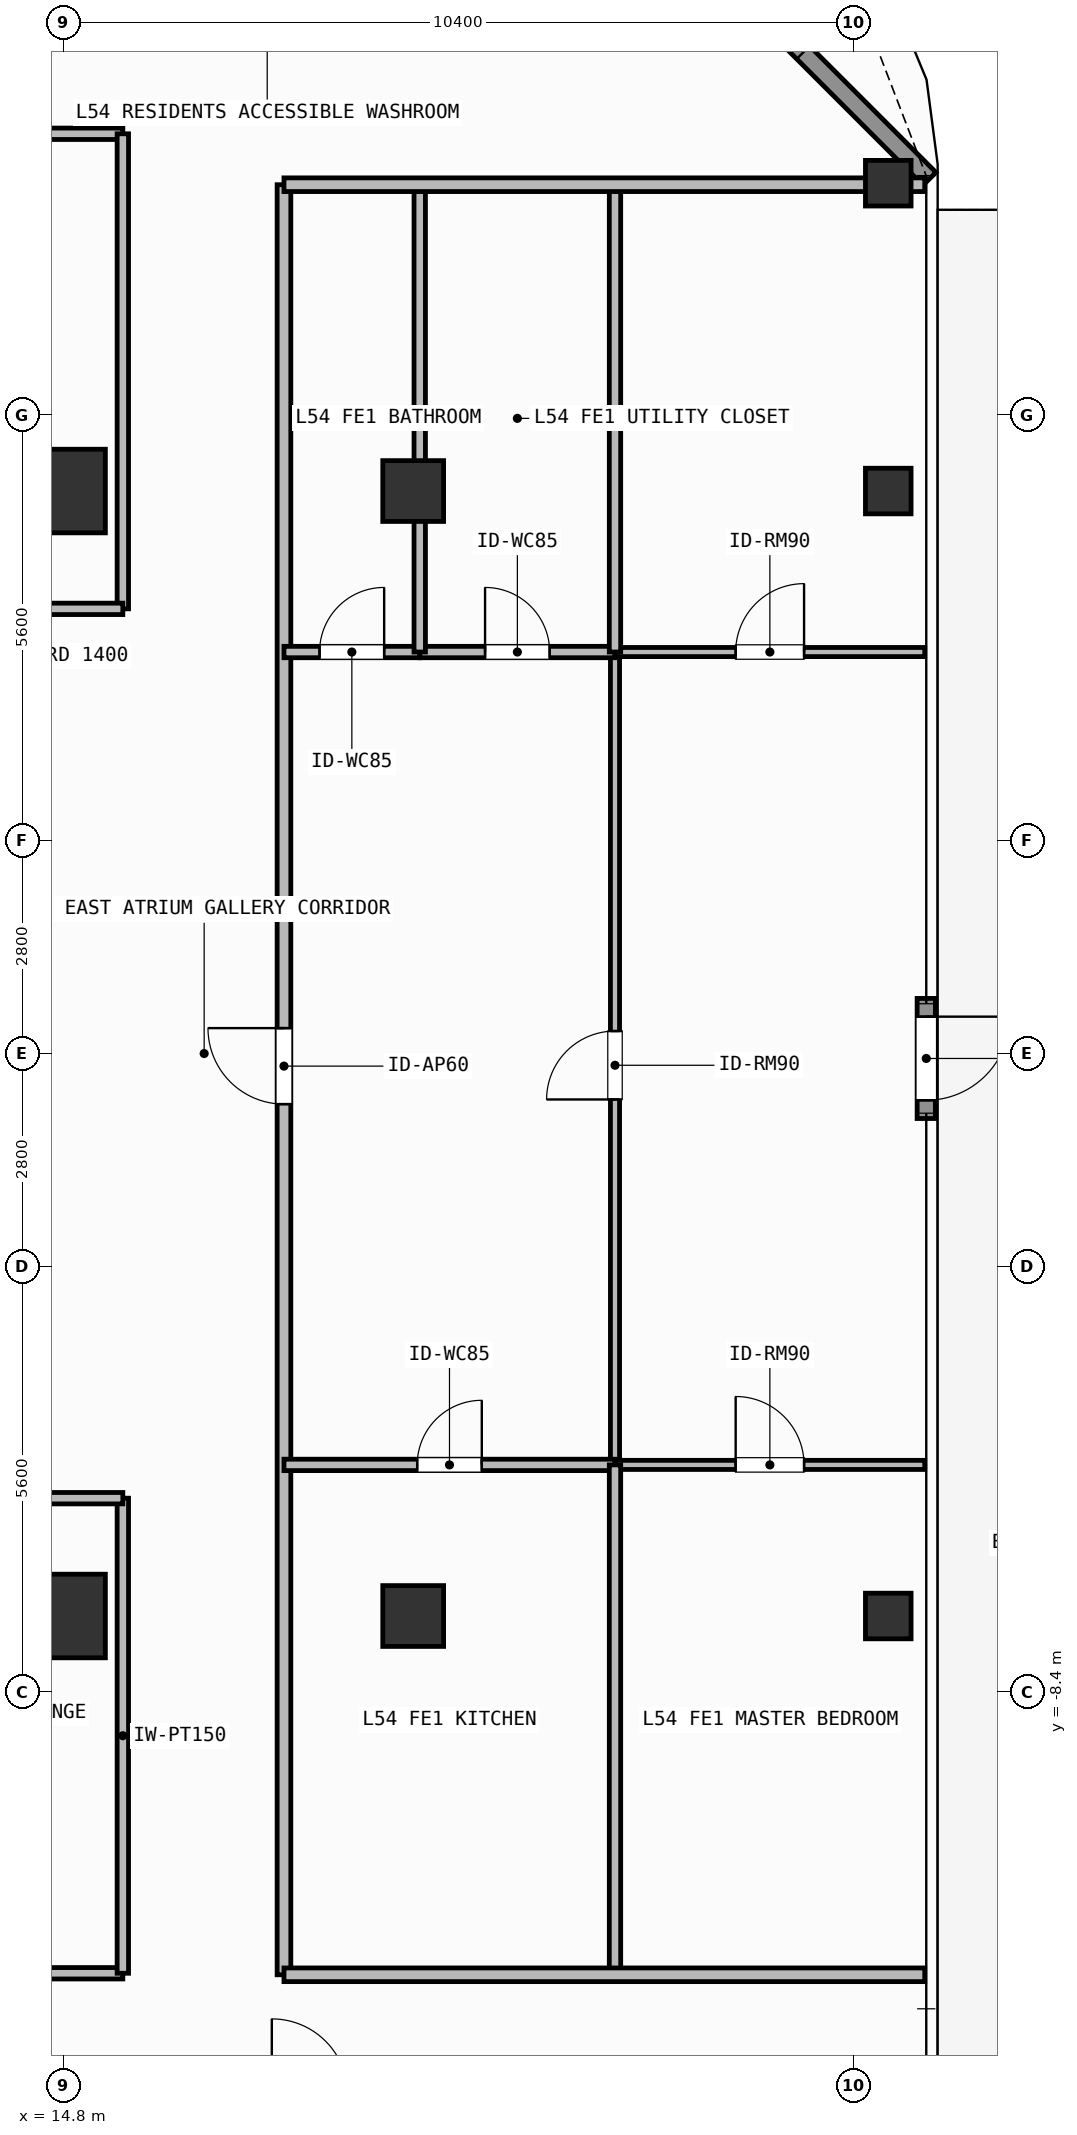
"""IFC4 building model, lengths in metres.
Left out: names, types, materials, properties, quantities, classifications, styles, units other than length and angle.
Written with IfcOpenShell. Run it as: python <this file> out.ifc"""

import sys

from ifc_helpers import new_model, si_unit, direction, frame, frame_2d, origin, origin_2d, place, context, subcontext, project, spatial, rectangle, hollow_rectangle, extrude, element, fill, save


model = new_model("IFC4")
c1 = context("Model", 3, precision=1e-05, world=origin(), true_north=direction((0.0, 1.0)))
c2 = subcontext(c1, "Body", "Model", "MODEL_VIEW")
j1 = project(units=[si_unit("LENGTHUNIT", "METRE"), si_unit("PLANEANGLEUNIT", "RADIAN")], contexts=[c1])
p1 = place(None, origin())
s1 = spatial("IfcSite", under=j1, at=p1, CompositionType="ELEMENT")
p2 = place(p1, origin())
s2 = spatial("IfcBuilding", under=s1, at=p2, CompositionType="ELEMENT")
p3 = place(p2, frame((0.0, 0.0, 219.6)))
s3 = spatial("IfcBuildingStorey", under=s2, at=p3, CompositionType="ELEMENT", Elevation=219.6)
for number, where, z_axis, x_axis in (
    (1, (14.8, -7.4, 0.0), (0.0, 0.0, 1.0), (1.0, 0.0, 0.0)),
    (2, (14.8, 7.4, 0.0), (0.0, 0.0, 1.0), (1.0, 0.0, 0.0)),
):
    element("IfcColumn", number, at=place(p3, frame(where, z_axis=z_axis, x_axis=x_axis)), inside=s3, PredefinedType="COLUMN", context=c2, shape_type="SweptSolid", body=[
        extrude(rectangle(XDim=1.1, YDim=1.1, at=origin_2d()), origin(), (0.0, 0.0, 1.0), 3.9),
    ])
for number, where, z_axis, x_axis in (
    (3, (19.4, -7.4, 0.0), (0.0, 0.0, 1.0), (1.0, 0.0, 0.0)),
    (4, (19.4, 7.4, 0.0), (0.0, 0.0, 1.0), (1.0, 0.0, 0.0)),
):
    element("IfcColumn", number, at=place(p3, frame(where, z_axis=z_axis, x_axis=x_axis)), inside=s3, PredefinedType="COLUMN", context=c2, shape_type="SweptSolid", body=[
        extrude(hollow_rectangle(XDim=0.8, YDim=0.8, WallThickness=0.036, at=origin_2d()), origin(), (0.0, 0.0, 1.0), 3.9),
    ])
for number, where, z_axis, x_axis in (
    (5, (25.65, 11.45, 0.0), (0.0, 0.0, 1.0), (1.0, 0.0, 0.0)),
    (6, (25.65, -7.4, 0.0), (0.0, 0.0, 1.0), (1.0, 0.0, 0.0)),
    (7, (25.65, 7.4, 0.0), (0.0, 0.0, 1.0), (1.0, 0.0, 0.0)),
):
    element("IfcColumn", number, at=place(p3, frame(where, z_axis=z_axis, x_axis=x_axis)), inside=s3, PredefinedType="COLUMN", context=c2, shape_type="SweptSolid", body=[
        extrude(hollow_rectangle(XDim=0.6, YDim=0.6, WallThickness=0.028, at=origin_2d()), origin(), (0.0, 0.0, 1.0), 3.9),
    ])
p4 = place(p3, frame((26.15, 0.725, 0.0), z_axis=(0.0, 0.0, 1.0), x_axis=(0.0, -1.0, 0.0)))
e8 = element("IfcWall", 8, at=p4, inside=s3, PredefinedType="SOLIDWALL", context=c2, shape_type="SweptSolid", body=[
    extrude(rectangle(XDim=1.58, YDim=0.24, at=frame_2d((0.79, 0.0))), origin(), (0.0, 0.0, 1.0), 3.68),
])
p5 = place(p4, frame((0.24, 0.0, 0.0)))
e9 = element("IfcOpeningElement", 9, at=p5, cuts=e8, PredefinedType="OPENING", context=c2, shape_type="SweptSolid", body=[
    extrude(rectangle(XDim=1.1, YDim=2.2, at=frame_2d((0.55, 1.1))), frame((0.0, 0.13, 0.0), z_axis=(0.0, -1.0, 0.0), x_axis=(1.0, 0.0, 0.0)), (0.0, 0.0, 1.0), 0.26),
])
p6 = place(p3, frame((21.808, 15.892, 0.0), z_axis=(0.0, 0.0, 1.0), x_axis=(0.707106781187, -0.707106781187, 0.0)))
e10 = element("IfcWall", 10, at=p6, inside=s3, PredefinedType="SOLIDWALL", context=c2, shape_type="SweptSolid", body=[
    extrude(rectangle(XDim=6.201, YDim=0.24, at=frame_2d((3.101, 0.0))), origin(), (0.0, 0.0, 1.0), 3.68),
])
p7 = place(p6, frame((2.351, 0.0, 0.8)))
e11 = element("IfcOpeningElement", 11, at=p7, cuts=e10, PredefinedType="OPENING", context=c2, shape_type="SweptSolid", body=[
    extrude(rectangle(XDim=1.5, YDim=1.85, at=frame_2d((0.75, 0.925))), frame((0.0, 0.13, 0.0), z_axis=(0.0, -1.0, 0.0), x_axis=(1.0, 0.0, 0.0)), (0.0, 0.0, 1.0), 0.26),
])
p8 = place(p3, frame((10.1, -12.1, 0.0), z_axis=(0.0, 0.0, 1.0), x_axis=(1.0, 0.0, 0.0)))
e12 = element("IfcWall", 12, at=p8, inside=s3, PredefinedType="PARTITIONING", context=c2, shape_type="SweptSolid", body=[
    extrude(rectangle(XDim=5.48, YDim=0.15, at=frame_2d((2.74, 0.0))), origin(), (0.0, 0.0, 1.0), 3.68),
])
p9 = place(p8, frame((2.29, 0.0, 0.0)))
e13 = element("IfcOpeningElement", 13, at=p9, cuts=e12, PredefinedType="OPENING", context=c2, shape_type="SweptSolid", body=[
    extrude(rectangle(XDim=0.9, YDim=2.1, at=frame_2d((0.45, 1.05))), frame((0.0, 0.085, 0.0), z_axis=(0.0, -1.0, 0.0), x_axis=(1.0, 0.0, 0.0)), (0.0, 0.0, 1.0), 0.17),
])
p10 = place(p3, frame((8.36, 12.1, 0.0), z_axis=(0.0, 0.0, 1.0), x_axis=(1.0, 0.0, 0.0)))
e14 = element("IfcWall", 14, at=p10, inside=s3, PredefinedType="PARTITIONING", context=c2, shape_type="SweptSolid", body=[
    extrude(rectangle(XDim=7.22, YDim=0.15, at=frame_2d((3.61, 0.0))), origin(), (0.0, 0.0, 1.0), 3.68),
])
p11 = place(p10, frame((3.513, 0.0, 0.0)))
e15 = element("IfcOpeningElement", 15, at=p11, cuts=e14, PredefinedType="OPENING", context=c2, shape_type="SweptSolid", body=[
    extrude(rectangle(XDim=0.9, YDim=2.1, at=frame_2d((0.45, 1.05))), frame((0.0, 0.085, 0.0), z_axis=(0.0, -1.0, 0.0), x_axis=(1.0, 0.0, 0.0)), (0.0, 0.0, 1.0), 0.17),
])
p12 = place(p3, frame((17.7, -12.12, 0.0), z_axis=(0.0, 0.0, 1.0), x_axis=(0.0, 1.0, 0.0)))
e16 = element("IfcWall", 16, at=p12, inside=s3, PredefinedType="PARTITIONING", context=c2, shape_type="SweptSolid", body=[
    extrude(rectangle(XDim=23.55, YDim=0.18, at=frame_2d((11.775, 0.0))), origin(), (0.0, 0.0, 1.0), 3.68),
])
p13 = place(p12, frame((11.454, 0.0, 0.0)))
e17 = element("IfcOpeningElement", 17, at=p13, cuts=e16, PredefinedType="OPENING", context=c2, shape_type="SweptSolid", body=[
    extrude(rectangle(XDim=1.0, YDim=2.2, at=frame_2d((0.5, 1.1))), frame((0.0, 0.1, 0.0), z_axis=(0.0, -1.0, 0.0), x_axis=(1.0, 0.0, 0.0)), (0.0, 0.0, 1.0), 0.2),
])
p14 = place(p3, frame((22.055, -5.412, 0.0), z_axis=(0.0, 0.0, 1.0), x_axis=(0.0, 1.0, 0.0)))
e18 = element("IfcWall", 18, at=p14, inside=s3, PredefinedType="PARTITIONING", context=c2, shape_type="SweptSolid", body=[
    extrude(rectangle(XDim=10.694, YDim=0.12, at=frame_2d((5.347, 0.0))), origin(), (0.0, 0.0, 1.0), 3.68),
])
p15 = place(p14, frame((4.808, 0.0, 0.0)))
e19 = element("IfcOpeningElement", 19, at=p15, cuts=e18, PredefinedType="OPENING", context=c2, shape_type="SweptSolid", body=[
    extrude(rectangle(XDim=0.9, YDim=2.1, at=frame_2d((0.45, 1.05))), frame((0.0, 0.07, 0.0), z_axis=(0.0, -1.0, 0.0), x_axis=(1.0, 0.0, 0.0)), (0.0, 0.0, 1.0), 0.14),
])
p16 = place(p3, frame((17.7, 5.282, 0.0), z_axis=(0.0, 0.0, 1.0), x_axis=(1.0, 0.0, 0.0)))
e20 = element("IfcWall", 20, at=p16, inside=s3, PredefinedType="PARTITIONING", context=c2, shape_type="SweptSolid", body=[
    extrude(rectangle(XDim=1.786, YDim=0.15, at=frame_2d((0.893, 0.0))), origin(), (0.0, 0.0, 1.0), 3.68),
])
p17 = place(p16, frame((0.468, 0.0, 0.0)))
e21 = element("IfcOpeningElement", 21, at=p17, cuts=e20, PredefinedType="OPENING", context=c2, shape_type="SweptSolid", body=[
    extrude(rectangle(XDim=0.85, YDim=2.1, at=frame_2d((0.425, 1.05))), frame((0.0, 0.085, 0.0), z_axis=(0.0, -1.0, 0.0), x_axis=(1.0, 0.0, 0.0)), (0.0, 0.0, 1.0), 0.17),
])
p18 = place(p3, frame((19.486, 5.282, 0.0), z_axis=(0.0, 0.0, 1.0), x_axis=(1.0, 0.0, 0.0)))
e22 = element("IfcWall", 22, at=p18, inside=s3, PredefinedType="PARTITIONING", context=c2, shape_type="SweptSolid", body=[
    extrude(rectangle(XDim=2.569, YDim=0.15, at=frame_2d((1.284, 0.0))), origin(), (0.0, 0.0, 1.0), 3.68),
])
p19 = place(p18, frame((0.86, 0.0, 0.0)))
e23 = element("IfcOpeningElement", 23, at=p19, cuts=e22, PredefinedType="OPENING", context=c2, shape_type="SweptSolid", body=[
    extrude(rectangle(XDim=0.85, YDim=2.1, at=frame_2d((0.425, 1.05))), frame((0.0, 0.085, 0.0), z_axis=(0.0, -1.0, 0.0), x_axis=(1.0, 0.0, 0.0)), (0.0, 0.0, 1.0), 0.17),
])
p20 = place(p3, frame((17.7, -5.412, 0.0), z_axis=(0.0, 0.0, 1.0), x_axis=(1.0, 0.0, 0.0)))
e24 = element("IfcWall", 24, at=p20, inside=s3, PredefinedType="PARTITIONING", context=c2, shape_type="SweptSolid", body=[
    extrude(rectangle(XDim=4.355, YDim=0.15, at=frame_2d((2.177, 0.0))), origin(), (0.0, 0.0, 1.0), 3.68),
])
p21 = place(p20, frame((1.752, 0.0, 0.0)))
e25 = element("IfcOpeningElement", 25, at=p21, cuts=e24, PredefinedType="OPENING", context=c2, shape_type="SweptSolid", body=[
    extrude(rectangle(XDim=0.85, YDim=2.1, at=frame_2d((0.425, 1.05))), frame((0.0, 0.085, 0.0), z_axis=(0.0, -1.0, 0.0), x_axis=(1.0, 0.0, 0.0)), (0.0, 0.0, 1.0), 0.17),
])
p22 = place(p3, frame((22.055, -5.412, 0.0), z_axis=(0.0, 0.0, 1.0), x_axis=(1.0, 0.0, 0.0)))
e26 = element("IfcWall", 26, at=p22, inside=s3, PredefinedType="PARTITIONING", context=c2, shape_type="SweptSolid", body=[
    extrude(rectangle(XDim=4.075, YDim=0.12, at=frame_2d((2.038, 0.0))), origin(), (0.0, 0.0, 1.0), 3.68),
])
p23 = place(p22, frame((1.587, 0.0, 0.0)))
e27 = element("IfcOpeningElement", 27, at=p23, cuts=e26, PredefinedType="OPENING", context=c2, shape_type="SweptSolid", body=[
    extrude(rectangle(XDim=0.9, YDim=2.1, at=frame_2d((0.45, 1.05))), frame((0.0, 0.07, 0.0), z_axis=(0.0, -1.0, 0.0), x_axis=(1.0, 0.0, 0.0)), (0.0, 0.0, 1.0), 0.14),
])
p24 = place(p3, frame((22.055, 5.282, 0.0), z_axis=(0.0, 0.0, 1.0), x_axis=(1.0, 0.0, 0.0)))
e28 = element("IfcWall", 28, at=p24, inside=s3, PredefinedType="PARTITIONING", context=c2, shape_type="SweptSolid", body=[
    extrude(rectangle(XDim=4.075, YDim=0.12, at=frame_2d((2.038, 0.0))), origin(), (0.0, 0.0, 1.0), 3.68),
])
p25 = place(p24, frame((1.587, 0.0, 0.0)))
e29 = element("IfcOpeningElement", 29, at=p25, cuts=e28, PredefinedType="OPENING", context=c2, shape_type="SweptSolid", body=[
    extrude(rectangle(XDim=0.9, YDim=2.1, at=frame_2d((0.45, 1.05))), frame((0.0, 0.07, 0.0), z_axis=(0.0, -1.0, 0.0), x_axis=(1.0, 0.0, 0.0)), (0.0, 0.0, 1.0), 0.14),
])
p26 = place(p3, frame((15.58, -12.1, 0.0), z_axis=(0.0, 0.0, 1.0), x_axis=(0.0, 1.0, 0.0)))
e30 = element("IfcWall", 30, at=p26, inside=s3, PredefinedType="PARTITIONING", context=c2, shape_type="SweptSolid", body=[
    extrude(rectangle(XDim=6.25, YDim=0.15, at=frame_2d((3.125, 0.0))), origin(), (0.0, 0.0, 1.0), 3.68),
])
p27 = place(p3, frame((8.96, -5.85, 0.0), z_axis=(0.0, 0.0, 1.0), x_axis=(1.0, 0.0, 0.0)))
e31 = element("IfcWall", 31, at=p27, inside=s3, PredefinedType="PARTITIONING", context=c2, shape_type="SweptSolid", body=[
    extrude(rectangle(XDim=6.62, YDim=0.15, at=frame_2d((3.31, 0.0))), origin(), (0.0, 0.0, 1.0), 3.68),
])
p28 = place(p3, frame((15.58, 5.85, 0.0), z_axis=(0.0, 0.0, 1.0), x_axis=(0.0, 1.0, 0.0)))
e32 = element("IfcWall", 32, at=p28, inside=s3, PredefinedType="PARTITIONING", context=c2, shape_type="SweptSolid", body=[
    extrude(rectangle(XDim=6.25, YDim=0.15, at=frame_2d((3.125, 0.0))), origin(), (0.0, 0.0, 1.0), 3.68),
])
p29 = place(p3, frame((8.96, 5.85, 0.0), z_axis=(0.0, 0.0, 1.0), x_axis=(1.0, 0.0, 0.0)))
e33 = element("IfcWall", 33, at=p29, inside=s3, PredefinedType="PARTITIONING", context=c2, shape_type="SweptSolid", body=[
    extrude(rectangle(XDim=6.62, YDim=0.15, at=frame_2d((3.31, 0.0))), origin(), (0.0, 0.0, 1.0), 3.68),
])
p30 = place(p3, frame((19.486, 5.282, 0.0), z_axis=(0.0, 0.0, 1.0), x_axis=(0.0, 1.0, 0.0)))
e34 = element("IfcWall", 34, at=p30, inside=s3, PredefinedType="PARTITIONING", context=c2, shape_type="SweptSolid", body=[
    extrude(rectangle(XDim=6.148, YDim=0.15, at=frame_2d((3.074, 0.0))), origin(), (0.0, 0.0, 1.0), 3.182),
])
p31 = place(p3, frame((22.055, -12.12, 0.0), z_axis=(0.0, 0.0, 1.0), x_axis=(0.0, 1.0, 0.0)))
e35 = element("IfcWall", 35, at=p31, inside=s3, PredefinedType="PARTITIONING", context=c2, shape_type="SweptSolid", body=[
    extrude(rectangle(XDim=6.708, YDim=0.15, at=frame_2d((3.354, 0.0))), origin(), (0.0, 0.0, 1.0), 3.68),
])
p32 = place(p3, frame((22.055, 5.282, 0.0), z_axis=(0.0, 0.0, 1.0), x_axis=(0.0, 1.0, 0.0)))
e36 = element("IfcWall", 36, at=p32, inside=s3, PredefinedType="PARTITIONING", context=c2, shape_type="SweptSolid", body=[
    extrude(rectangle(XDim=6.148, YDim=0.15, at=frame_2d((3.074, 0.0))), origin(), (0.0, 0.0, 1.0), 3.68),
])
p33 = place(p3, frame((17.7, -12.12, 0.0), z_axis=(0.0, 0.0, 1.0), x_axis=(1.0, 0.0, 0.0)))
e37 = element("IfcWall", 37, at=p33, inside=s3, PredefinedType="PARTITIONING", context=c2, shape_type="SweptSolid", body=[
    extrude(rectangle(XDim=8.43, YDim=0.18, at=frame_2d((4.215, 0.0))), origin(), (0.0, 0.0, 1.0), 3.68),
])
p34 = place(p3, frame((17.7, 11.43, 0.0), z_axis=(0.0, 0.0, 1.0), x_axis=(1.0, 0.0, 0.0)))
e38 = element("IfcWall", 38, at=p34, inside=s3, PredefinedType="PARTITIONING", context=c2, shape_type="SweptSolid", body=[
    extrude(rectangle(XDim=8.43, YDim=0.18, at=frame_2d((4.215, 0.0))), origin(), (0.0, 0.0, 1.0), 3.42),
])
p35 = place(p5, origin())
e39 = element("IfcDoor", 39, at=p35, inside=s3, OperationType="SINGLE_SWING_LEFT", PredefinedType="DOOR", context=c2, shape_type="SweptSolid", body=[
    extrude(rectangle(XDim=1.1, YDim=2.2, at=frame_2d((0.55, 1.1))), frame((0.0, 0.025, 0.0), z_axis=(0.0, -1.0, 0.0), x_axis=(1.0, 0.0, 0.0)), (0.0, 0.0, 1.0), 0.05),
])
fill(e9, e39)
p36 = place(p7, origin())
e40 = element("IfcWindow", 40, at=p36, inside=s3, PartitioningType="SINGLE_PANEL", PredefinedType="WINDOW", context=c2, shape_type="SweptSolid", body=[
    extrude(rectangle(XDim=1.5, YDim=1.85, at=frame_2d((0.75, 0.925))), frame((0.0, 0.03, 0.0), z_axis=(0.0, -1.0, 0.0), x_axis=(1.0, 0.0, 0.0)), (0.0, 0.0, 1.0), 0.06),
])
fill(e11, e40)
p37 = place(p13, origin())
e41 = element("IfcDoor", 41, at=p37, inside=s3, OperationType="SINGLE_SWING_RIGHT", PredefinedType="DOOR", context=c2, shape_type="SweptSolid", body=[
    extrude(rectangle(XDim=1.0, YDim=2.2, at=frame_2d((0.5, 1.1))), frame((0.0, 0.025, 0.0), z_axis=(0.0, -1.0, 0.0), x_axis=(1.0, 0.0, 0.0)), (0.0, 0.0, 1.0), 0.05),
])
fill(e17, e41)
p38 = place(p15, origin())
e42 = element("IfcDoor", 42, at=p38, inside=s3, OperationType="SINGLE_SWING_LEFT", PredefinedType="DOOR", context=c2, shape_type="SweptSolid", body=[
    extrude(rectangle(XDim=0.9, YDim=2.1, at=frame_2d((0.45, 1.05))), frame((0.0, 0.025, 0.0), z_axis=(0.0, -1.0, 0.0), x_axis=(1.0, 0.0, 0.0)), (0.0, 0.0, 1.0), 0.05),
])
fill(e19, e42)
p39 = place(p17, origin())
e43 = element("IfcDoor", 43, at=p39, inside=s3, OperationType="SINGLE_SWING_RIGHT", PredefinedType="DOOR", context=c2, shape_type="SweptSolid", body=[
    extrude(rectangle(XDim=0.85, YDim=2.1, at=frame_2d((0.425, 1.05))), frame((0.0, 0.025, 0.0), z_axis=(0.0, -1.0, 0.0), x_axis=(1.0, 0.0, 0.0)), (0.0, 0.0, 1.0), 0.05),
])
fill(e21, e43)
p40 = place(p19, origin())
e44 = element("IfcDoor", 44, at=p40, inside=s3, OperationType="SINGLE_SWING_LEFT", PredefinedType="DOOR", context=c2, shape_type="SweptSolid", body=[
    extrude(rectangle(XDim=0.85, YDim=2.1, at=frame_2d((0.425, 1.05))), frame((0.0, 0.025, 0.0), z_axis=(0.0, -1.0, 0.0), x_axis=(1.0, 0.0, 0.0)), (0.0, 0.0, 1.0), 0.05),
])
fill(e23, e44)
p41 = place(p21, origin())
e45 = element("IfcDoor", 45, at=p41, inside=s3, OperationType="SINGLE_SWING_RIGHT", PredefinedType="DOOR", context=c2, shape_type="SweptSolid", body=[
    extrude(rectangle(XDim=0.85, YDim=2.1, at=frame_2d((0.425, 1.05))), frame((0.0, 0.025, 0.0), z_axis=(0.0, -1.0, 0.0), x_axis=(1.0, 0.0, 0.0)), (0.0, 0.0, 1.0), 0.05),
])
fill(e25, e45)
p42 = place(p23, origin())
e46 = element("IfcDoor", 46, at=p42, inside=s3, OperationType="SINGLE_SWING_LEFT", PredefinedType="DOOR", context=c2, shape_type="SweptSolid", body=[
    extrude(rectangle(XDim=0.9, YDim=2.1, at=frame_2d((0.45, 1.05))), frame((0.0, 0.025, 0.0), z_axis=(0.0, -1.0, 0.0), x_axis=(1.0, 0.0, 0.0)), (0.0, 0.0, 1.0), 0.05),
])
fill(e27, e46)
p43 = place(p25, origin())
e47 = element("IfcDoor", 47, at=p43, inside=s3, OperationType="SINGLE_SWING_RIGHT", PredefinedType="DOOR", context=c2, shape_type="SweptSolid", body=[
    extrude(rectangle(XDim=0.9, YDim=2.1, at=frame_2d((0.45, 1.05))), frame((0.0, 0.025, 0.0), z_axis=(0.0, -1.0, 0.0), x_axis=(1.0, 0.0, 0.0)), (0.0, 0.0, 1.0), 0.05),
])
fill(e29, e47)
save(model, sys.argv[1])
